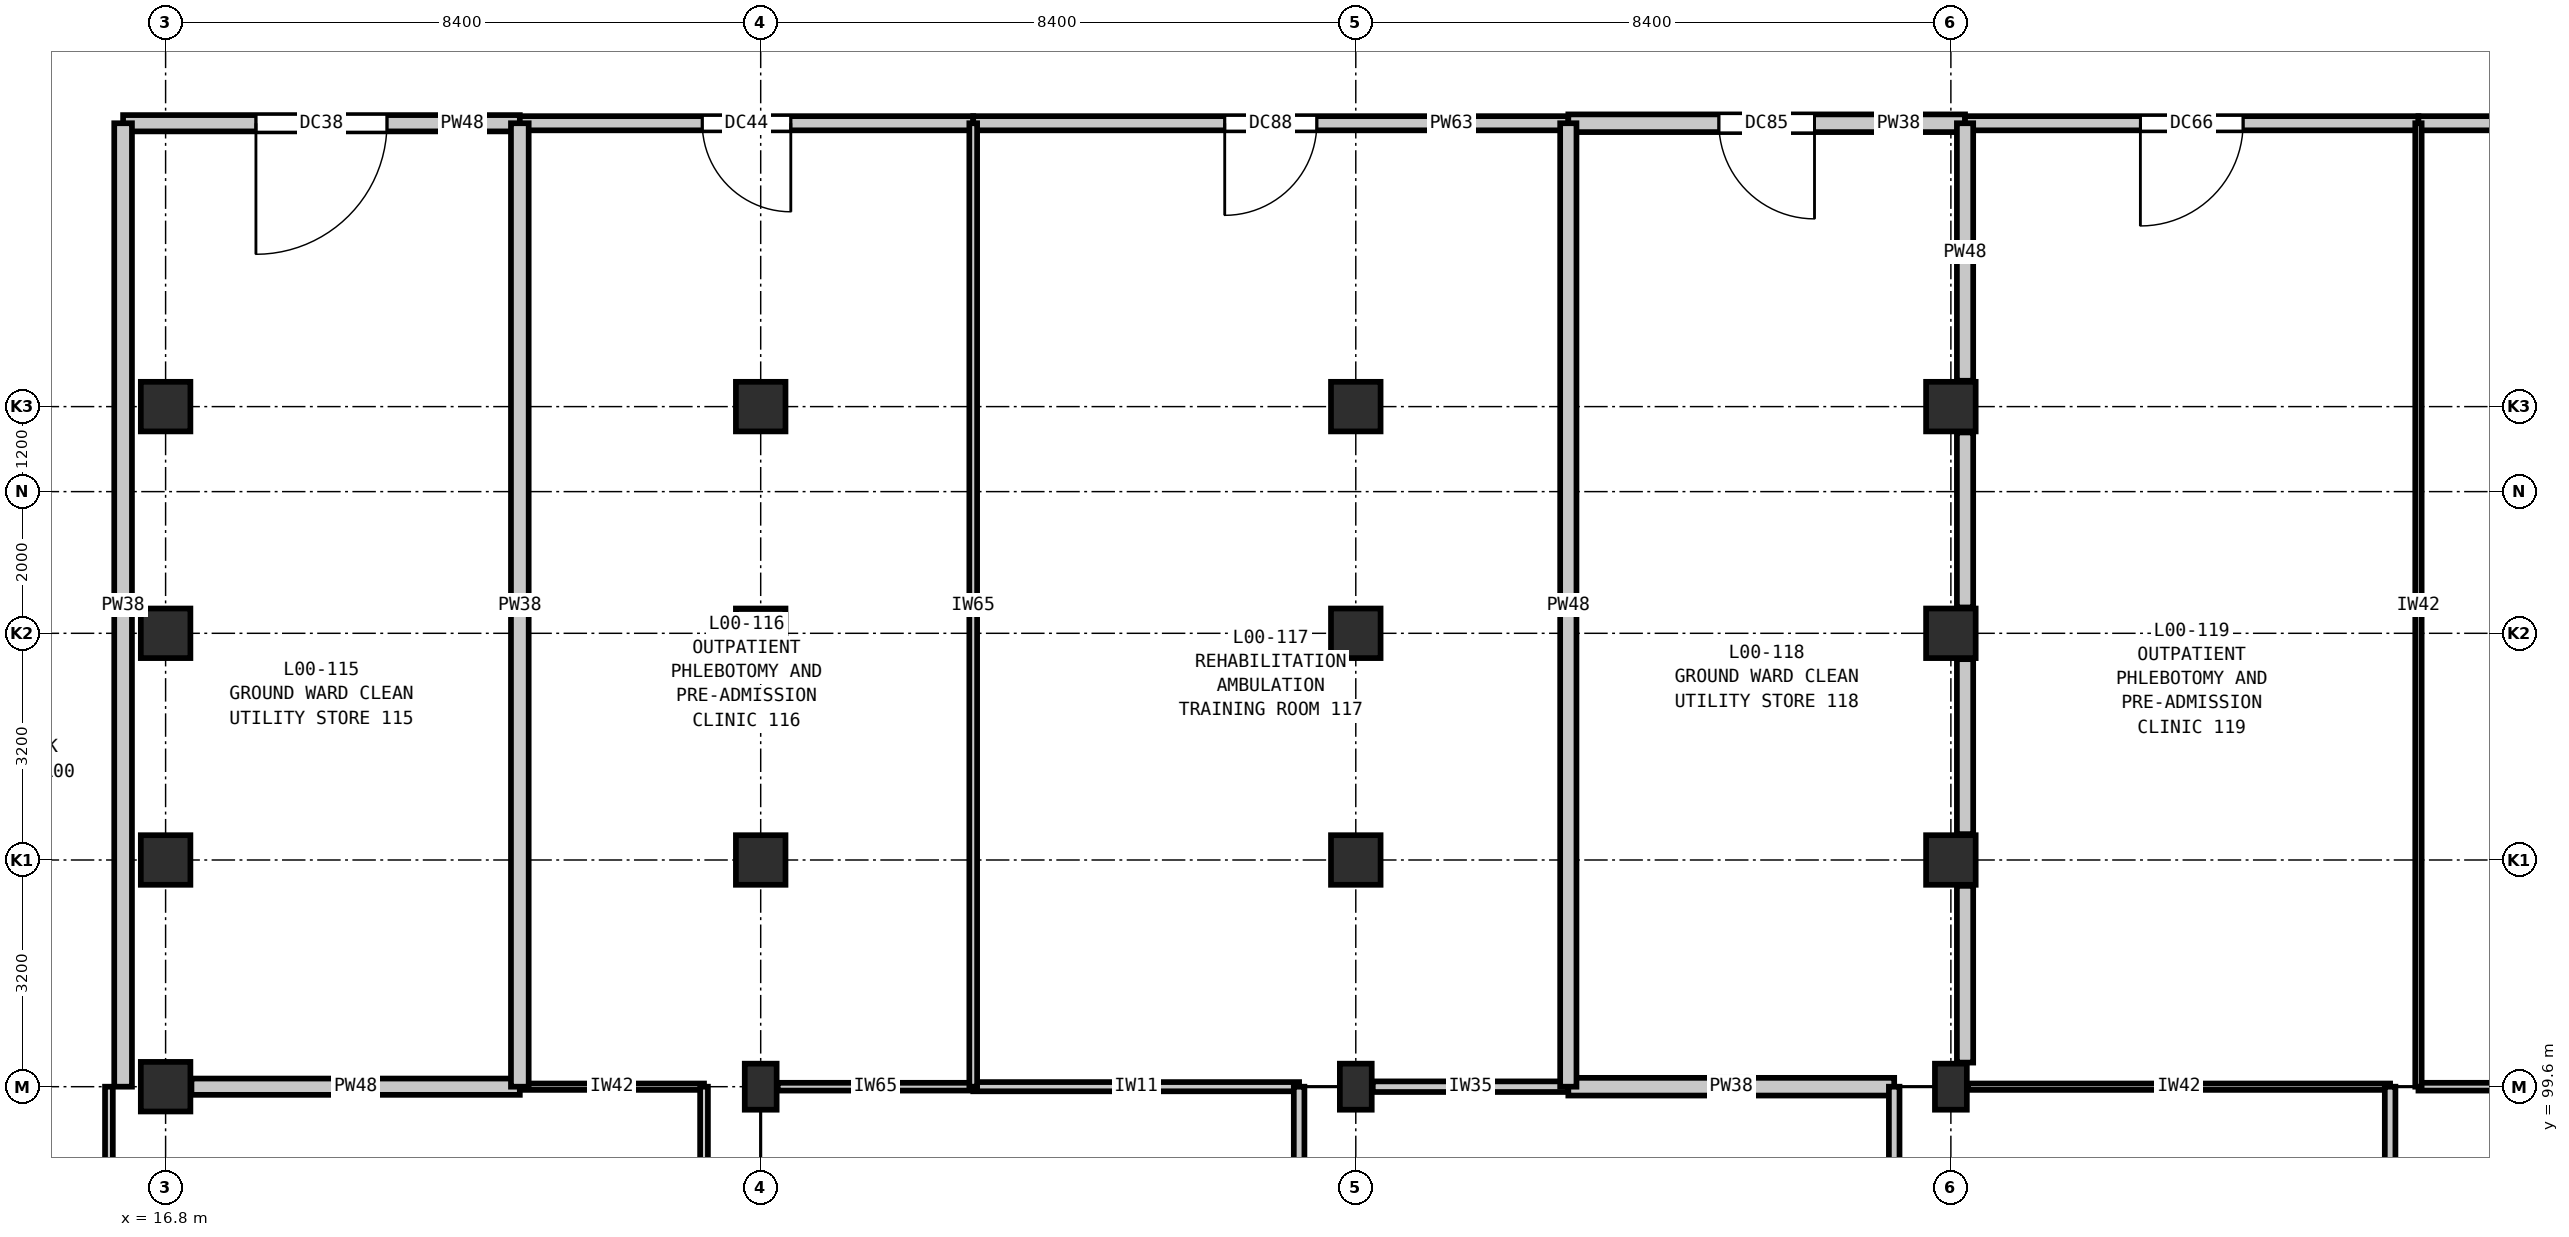
"""IFC4 building model, lengths in metres.
Left out: names, types, materials, properties, quantities, classifications, styles, units other than length and angle.
Written with IfcOpenShell. Run it as: python <this file> out.ifc"""

import sys

from ifc_helpers import new_model, si_unit, direction, frame, frame_2d, origin, origin_2d, place, context, subcontext, project, spatial, rectangle, extrude, element, fill, save


model = new_model("IFC4")
c1 = context("Model", 3, precision=1e-05, world=origin(), true_north=direction((0.0, 1.0)))
c2 = subcontext(c1, "Body", "Model", "MODEL_VIEW")
j1 = project(units=[si_unit("LENGTHUNIT", "METRE"), si_unit("PLANEANGLEUNIT", "RADIAN")], contexts=[c1])
p1 = place(None, origin())
s1 = spatial("IfcSite", under=j1, at=p1, CompositionType="ELEMENT")
p2 = place(p1, origin())
s2 = spatial("IfcBuilding", under=s1, at=p2, CompositionType="ELEMENT")
p3 = place(p2, origin())
s3 = spatial("IfcBuildingStorey", under=s2, at=p3, CompositionType="ELEMENT", Elevation=0.0)
for number, where, z_axis, x_axis in (
    (1, (16.8, 99.6, 0.0), (0.0, 0.0, 1.0), (1.0, 0.0, 0.0)),
    (2, (16.8, 102.8, 0.0), (0.0, 0.0, 1.0), (1.0, 0.0, 0.0)),
    (3, (16.8, 106.0, 0.0), (0.0, 0.0, 1.0), (1.0, 0.0, 0.0)),
    (4, (16.8, 109.2, 0.0), (0.0, 0.0, 1.0), (1.0, 0.0, 0.0)),
):
    element("IfcColumn", number, at=place(p3, frame(where, z_axis=z_axis, x_axis=x_axis)), inside=s3, PredefinedType="COLUMN", context=c2, shape_type="SweptSolid", body=[
        extrude(rectangle(XDim=0.7, YDim=0.7, at=origin_2d()), origin(), (0.0, 0.0, 1.0), 5.4),
    ])
p4 = place(p3, frame((25.2, 99.6, 0.0), z_axis=(0.0, 0.0, 1.0), x_axis=(1.0, 0.0, 0.0)))
e5 = element("IfcColumn", 5, at=p4, inside=s3, PredefinedType="COLUMN", context=c2, shape_type="SweptSolid", body=[
    extrude(rectangle(XDim=0.45, YDim=0.65, at=origin_2d()), origin(), (0.0, 0.0, 1.0), 5.4),
])
for number, where, z_axis, x_axis in (
    (6, (25.2, 102.8, 0.0), (0.0, 0.0, 1.0), (1.0, 0.0, 0.0)),
    (7, (25.2, 106.0, 0.0), (0.0, 0.0, 1.0), (1.0, 0.0, 0.0)),
    (8, (25.2, 109.2, 0.0), (0.0, 0.0, 1.0), (1.0, 0.0, 0.0)),
):
    element("IfcColumn", number, at=place(p3, frame(where, z_axis=z_axis, x_axis=x_axis)), inside=s3, PredefinedType="COLUMN", context=c2, shape_type="SweptSolid", body=[
        extrude(rectangle(XDim=0.7, YDim=0.7, at=origin_2d()), origin(), (0.0, 0.0, 1.0), 5.4),
    ])
p5 = place(p3, frame((33.6, 99.6, 0.0), z_axis=(0.0, 0.0, 1.0), x_axis=(1.0, 0.0, 0.0)))
e9 = element("IfcColumn", 9, at=p5, inside=s3, PredefinedType="COLUMN", context=c2, shape_type="SweptSolid", body=[
    extrude(rectangle(XDim=0.45, YDim=0.65, at=origin_2d()), origin(), (0.0, 0.0, 1.0), 5.4),
])
for number, where, z_axis, x_axis in (
    (10, (33.6, 102.8, 0.0), (0.0, 0.0, 1.0), (1.0, 0.0, 0.0)),
    (11, (33.6, 106.0, 0.0), (0.0, 0.0, 1.0), (1.0, 0.0, 0.0)),
    (12, (33.6, 109.2, 0.0), (0.0, 0.0, 1.0), (1.0, 0.0, 0.0)),
):
    element("IfcColumn", number, at=place(p3, frame(where, z_axis=z_axis, x_axis=x_axis)), inside=s3, PredefinedType="COLUMN", context=c2, shape_type="SweptSolid", body=[
        extrude(rectangle(XDim=0.7, YDim=0.7, at=origin_2d()), origin(), (0.0, 0.0, 1.0), 5.4),
    ])
p6 = place(p3, frame((42.0, 99.6, 0.0), z_axis=(0.0, 0.0, 1.0), x_axis=(1.0, 0.0, 0.0)))
e13 = element("IfcColumn", 13, at=p6, inside=s3, PredefinedType="COLUMN", context=c2, shape_type="SweptSolid", body=[
    extrude(rectangle(XDim=0.45, YDim=0.65, at=origin_2d()), origin(), (0.0, 0.0, 1.0), 5.4),
])
for number, where, z_axis, x_axis in (
    (14, (42.0, 102.8, 0.0), (0.0, 0.0, 1.0), (1.0, 0.0, 0.0)),
    (15, (42.0, 106.0, 0.0), (0.0, 0.0, 1.0), (1.0, 0.0, 0.0)),
    (16, (42.0, 109.2, 0.0), (0.0, 0.0, 1.0), (1.0, 0.0, 0.0)),
):
    element("IfcColumn", number, at=place(p3, frame(where, z_axis=z_axis, x_axis=x_axis)), inside=s3, PredefinedType="COLUMN", context=c2, shape_type="SweptSolid", body=[
        extrude(rectangle(XDim=0.7, YDim=0.7, at=origin_2d()), origin(), (0.0, 0.0, 1.0), 5.4),
    ])
p7 = place(p3, frame((17.165, 99.6, 0.0), z_axis=(0.0, 0.0, 1.0), x_axis=(1.0, 0.0, 0.0)))
e17 = element("IfcWall", 17, at=p7, inside=s3, PredefinedType="PARTITIONING", context=c2, shape_type="SweptSolid", body=[
    extrude(rectangle(XDim=4.635, YDim=0.23, at=frame_2d((2.317, 0.0))), origin(), (0.0, 0.0, 1.0), 4.635),
])
p8 = place(p3, frame((21.8, 99.6, 0.0), z_axis=(0.0, 0.0, 1.0), x_axis=(1.0, 0.0, 0.0)))
e18 = element("IfcWall", 18, at=p8, inside=s3, PredefinedType="PARTITIONING", context=c2, shape_type="SweptSolid", body=[
    extrude(rectangle(XDim=2.6, YDim=0.09, at=frame_2d((1.3, 0.0))), origin(), (0.0, 0.0, 1.0), 4.635),
])
p9 = place(p3, frame((25.44, 99.6, 0.0), z_axis=(0.0, 0.0, 1.0), x_axis=(1.0, 0.0, 0.0)))
e19 = element("IfcWall", 19, at=p9, inside=s3, PredefinedType="PARTITIONING", context=c2, shape_type="SweptSolid", body=[
    extrude(rectangle(XDim=2.76, YDim=0.11, at=frame_2d((1.38, 0.0))), origin(), (0.0, 0.0, 1.0), 4.635),
])
p10 = place(p3, frame((28.2, 99.6, 0.0), z_axis=(0.0, 0.0, 1.0), x_axis=(1.0, 0.0, 0.0)))
e20 = element("IfcWall", 20, at=p10, inside=s3, PredefinedType="PARTITIONING", context=c2, shape_type="SweptSolid", body=[
    extrude(rectangle(XDim=4.6, YDim=0.13, at=frame_2d((2.3, 0.0))), origin(), (0.0, 0.0, 1.0), 4.635),
])
p11 = place(p3, frame((33.84, 99.6, 0.0), z_axis=(0.0, 0.0, 1.0), x_axis=(1.0, 0.0, 0.0)))
e21 = element("IfcWall", 21, at=p11, inside=s3, PredefinedType="PARTITIONING", context=c2, shape_type="SweptSolid", body=[
    extrude(rectangle(XDim=2.76, YDim=0.15, at=frame_2d((1.38, 0.0))), origin(), (0.0, 0.0, 1.0), 4.635),
])
p12 = place(p3, frame((36.6, 99.6, 0.0), z_axis=(0.0, 0.0, 1.0), x_axis=(1.0, 0.0, 0.0)))
e22 = element("IfcWall", 22, at=p12, inside=s3, PredefinedType="PARTITIONING", context=c2, shape_type="SweptSolid", body=[
    extrude(rectangle(XDim=4.6, YDim=0.25, at=frame_2d((2.3, 0.0))), origin(), (0.0, 0.0, 1.0), 4.635),
])
p13 = place(p3, frame((42.24, 99.6, 0.0), z_axis=(0.0, 0.0, 1.0), x_axis=(1.0, 0.0, 0.0)))
e23 = element("IfcWall", 23, at=p13, inside=s3, PredefinedType="PARTITIONING", context=c2, shape_type="SweptSolid", body=[
    extrude(rectangle(XDim=5.96, YDim=0.09, at=frame_2d((2.98, 0.0))), origin(), (0.0, 0.0, 1.0), 4.635),
])
p14 = place(p3, frame((48.6, 99.6, 0.0), z_axis=(0.0, 0.0, 1.0), x_axis=(1.0, 0.0, 0.0)))
e24 = element("IfcWall", 24, at=p14, inside=s3, PredefinedType="PARTITIONING", context=c2, shape_type="SweptSolid", body=[
    extrude(rectangle(XDim=1.56, YDim=0.11, at=frame_2d((0.78, 0.0))), origin(), (0.0, 0.0, 1.0), 4.635),
])
p15 = place(p3, frame((16.2, 113.2, 0.0), z_axis=(0.0, 0.0, 1.0), x_axis=(1.0, 0.0, 0.0)))
e25 = element("IfcWall", 25, at=p15, inside=s3, PredefinedType="PARTITIONING", context=c2, shape_type="SweptSolid", body=[
    extrude(rectangle(XDim=5.6, YDim=0.23, at=frame_2d((2.8, 0.0))), origin(), (0.0, 0.0, 1.0), 5.04),
])
p16 = place(p15, frame((1.875, 0.0, 0.0)))
e26 = element("IfcOpeningElement", 26, at=p16, cuts=e25, PredefinedType="OPENING", context=c2, shape_type="SweptSolid", body=[
    extrude(rectangle(XDim=1.85, YDim=2.3, at=frame_2d((0.925, 1.15))), frame((0.0, 0.125, 0.0), z_axis=(0.0, -1.0, 0.0), x_axis=(1.0, 0.0, 0.0)), (0.0, 0.0, 1.0), 0.25),
])
p17 = place(p3, frame((21.8, 113.2, 0.0), z_axis=(0.0, 0.0, 1.0), x_axis=(1.0, 0.0, 0.0)))
e27 = element("IfcWall", 27, at=p17, inside=s3, PredefinedType="PARTITIONING", context=c2, shape_type="SweptSolid", body=[
    extrude(rectangle(XDim=6.4, YDim=0.2, at=frame_2d((3.2, 0.0))), origin(), (0.0, 0.0, 1.0), 5.04),
])
p18 = place(p17, frame((2.575, 0.0, 0.0)))
e28 = element("IfcOpeningElement", 28, at=p18, cuts=e27, PredefinedType="OPENING", context=c2, shape_type="SweptSolid", body=[
    extrude(rectangle(XDim=1.25, YDim=2.15, at=frame_2d((0.625, 1.075))), frame((0.0, 0.11, 0.0), z_axis=(0.0, -1.0, 0.0), x_axis=(1.0, 0.0, 0.0)), (0.0, 0.0, 1.0), 0.22),
])
p19 = place(p3, frame((28.2, 113.2, 0.0), z_axis=(0.0, 0.0, 1.0), x_axis=(1.0, 0.0, 0.0)))
e29 = element("IfcWall", 29, at=p19, inside=s3, PredefinedType="PARTITIONING", context=c2, shape_type="SweptSolid", body=[
    extrude(rectangle(XDim=8.4, YDim=0.2, at=frame_2d((4.2, 0.0))), origin(), (0.0, 0.0, 1.0), 5.04),
])
p20 = place(p19, frame((3.55, 0.0, 0.0)))
e30 = element("IfcOpeningElement", 30, at=p20, cuts=e29, PredefinedType="OPENING", context=c2, shape_type="SweptSolid", body=[
    extrude(rectangle(XDim=1.3, YDim=2.2, at=frame_2d((0.65, 1.1))), frame((0.0, 0.11, 0.0), z_axis=(0.0, -1.0, 0.0), x_axis=(1.0, 0.0, 0.0)), (0.0, 0.0, 1.0), 0.22),
])
p21 = place(p3, frame((36.6, 113.2, 0.0), z_axis=(0.0, 0.0, 1.0), x_axis=(1.0, 0.0, 0.0)))
e31 = element("IfcWall", 31, at=p21, inside=s3, PredefinedType="PARTITIONING", context=c2, shape_type="SweptSolid", body=[
    extrude(rectangle(XDim=5.6, YDim=0.25, at=frame_2d((2.8, 0.0))), origin(), (0.0, 0.0, 1.0), 5.04),
])
p22 = place(p21, frame((2.125, 0.0, 0.0)))
e32 = element("IfcOpeningElement", 32, at=p22, cuts=e31, PredefinedType="OPENING", context=c2, shape_type="SweptSolid", body=[
    extrude(rectangle(XDim=1.35, YDim=2.2, at=frame_2d((0.675, 1.1))), frame((0.0, 0.135, 0.0), z_axis=(0.0, -1.0, 0.0), x_axis=(1.0, 0.0, 0.0)), (0.0, 0.0, 1.0), 0.27),
])
p23 = place(p3, frame((42.2, 113.2, 0.0), z_axis=(0.0, 0.0, 1.0), x_axis=(1.0, 0.0, 0.0)))
e33 = element("IfcWall", 33, at=p23, inside=s3, PredefinedType="PARTITIONING", context=c2, shape_type="SweptSolid", body=[
    extrude(rectangle(XDim=6.4, YDim=0.2, at=frame_2d((3.2, 0.0))), origin(), (0.0, 0.0, 1.0), 5.04),
])
p24 = place(p23, frame((2.475, 0.0, 0.0)))
e34 = element("IfcOpeningElement", 34, at=p24, cuts=e33, PredefinedType="OPENING", context=c2, shape_type="SweptSolid", body=[
    extrude(rectangle(XDim=1.45, YDim=2.25, at=frame_2d((0.725, 1.125))), frame((0.0, 0.11, 0.0), z_axis=(0.0, -1.0, 0.0), x_axis=(1.0, 0.0, 0.0)), (0.0, 0.0, 1.0), 0.22),
])
p25 = place(p3, frame((48.6, 113.2, 0.0), z_axis=(0.0, 0.0, 1.0), x_axis=(1.0, 0.0, 0.0)))
e35 = element("IfcWall", 35, at=p25, inside=s3, PredefinedType="PARTITIONING", context=c2, shape_type="SweptSolid", body=[
    extrude(rectangle(XDim=8.4, YDim=0.2, at=frame_2d((4.2, 0.0))), origin(), (0.0, 0.0, 1.0), 5.04),
])
p26 = place(p25, frame((3.425, 0.0, 0.0)))
e36 = element("IfcOpeningElement", 36, at=p26, cuts=e35, PredefinedType="OPENING", context=c2, shape_type="SweptSolid", body=[
    extrude(rectangle(XDim=1.55, YDim=2.25, at=frame_2d((0.775, 1.125))), frame((0.0, 0.11, 0.0), z_axis=(0.0, -1.0, 0.0), x_axis=(1.0, 0.0, 0.0)), (0.0, 0.0, 1.0), 0.22),
])
p27 = place(p3, frame((16.0, 88.6, 0.0), z_axis=(0.0, 0.0, 1.0), x_axis=(0.0, 1.0, 0.0)))
e37 = element("IfcWall", 37, at=p27, inside=s3, PredefinedType="PARTITIONING", context=c2, shape_type="SweptSolid", body=[
    extrude(rectangle(XDim=11.0, YDim=0.11, at=frame_2d((5.5, 0.0))), origin(), (0.0, 0.0, 1.0), 5.04),
])
for number, where, z_axis, x_axis in (
    (38, (16.2, 99.6, 0.0), (0.0, 0.0, 1.0), (0.0, 1.0, 0.0)),
    (39, (21.8, 99.6, 0.0), (0.0, 0.0, 1.0), (0.0, 1.0, 0.0)),
):
    element("IfcWall", number, at=place(p3, frame(where, z_axis=z_axis, x_axis=x_axis)), inside=s3, PredefinedType="PARTITIONING", context=c2, shape_type="SweptSolid", body=[
        extrude(rectangle(XDim=13.6, YDim=0.25, at=frame_2d((6.8, 0.0))), origin(), (0.0, 0.0, 1.0), 5.04),
    ])
p28 = place(p3, frame((24.4, 88.6, 0.0), z_axis=(0.0, 0.0, 1.0), x_axis=(0.0, 1.0, 0.0)))
e40 = element("IfcWall", 40, at=p28, inside=s3, PredefinedType="PARTITIONING", context=c2, shape_type="SweptSolid", body=[
    extrude(rectangle(XDim=11.0, YDim=0.11, at=frame_2d((5.5, 0.0))), origin(), (0.0, 0.0, 1.0), 5.04),
])
p29 = place(p3, frame((28.2, 99.6, 0.0), z_axis=(0.0, 0.0, 1.0), x_axis=(0.0, 1.0, 0.0)))
e41 = element("IfcWall", 41, at=p29, inside=s3, PredefinedType="PARTITIONING", context=c2, shape_type="SweptSolid", body=[
    extrude(rectangle(XDim=13.6, YDim=0.11, at=frame_2d((6.8, 0.0))), origin(), (0.0, 0.0, 1.0), 5.04),
])
p30 = place(p3, frame((32.8, 88.6, 0.0), z_axis=(0.0, 0.0, 1.0), x_axis=(0.0, 1.0, 0.0)))
e42 = element("IfcWall", 42, at=p30, inside=s3, PredefinedType="PARTITIONING", context=c2, shape_type="SweptSolid", body=[
    extrude(rectangle(XDim=11.0, YDim=0.15, at=frame_2d((5.5, 0.0))), origin(), (0.0, 0.0, 1.0), 5.04),
])
p31 = place(p3, frame((36.6, 99.6, 0.0), z_axis=(0.0, 0.0, 1.0), x_axis=(0.0, 1.0, 0.0)))
e43 = element("IfcWall", 43, at=p31, inside=s3, PredefinedType="PARTITIONING", context=c2, shape_type="SweptSolid", body=[
    extrude(rectangle(XDim=13.6, YDim=0.23, at=frame_2d((6.8, 0.0))), origin(), (0.0, 0.0, 1.0), 5.04),
])
p32 = place(p3, frame((41.2, 88.6, 0.0), z_axis=(0.0, 0.0, 1.0), x_axis=(0.0, 1.0, 0.0)))
e44 = element("IfcWall", 44, at=p32, inside=s3, PredefinedType="PARTITIONING", context=c2, shape_type="SweptSolid", body=[
    extrude(rectangle(XDim=11.0, YDim=0.15, at=frame_2d((5.5, 0.0))), origin(), (0.0, 0.0, 1.0), 5.04),
])
p33 = place(p3, frame((42.2, 109.565, 0.0), z_axis=(0.0, 0.0, 1.0), x_axis=(0.0, 1.0, 0.0)))
e45 = element("IfcWall", 45, at=p33, inside=s3, PredefinedType="PARTITIONING", context=c2, shape_type="SweptSolid", body=[
    extrude(rectangle(XDim=3.635, YDim=0.23, at=frame_2d((1.817, 0.0))), origin(), (0.0, 0.0, 1.0), 4.685),
])
p34 = place(p3, frame((42.2, 99.94, 0.0), z_axis=(0.0, 0.0, 1.0), x_axis=(0.0, 1.0, 0.0)))
e46 = element("IfcWall", 46, at=p34, inside=s3, PredefinedType="PARTITIONING", context=c2, shape_type="SweptSolid", body=[
    extrude(rectangle(XDim=2.495, YDim=0.23, at=frame_2d((1.248, 0.0))), origin(), (0.0, 0.0, 1.0), 4.685),
])
for number, where, z_axis, x_axis in (
    (47, (42.2, 103.165, 0.0), (0.0, 0.0, 1.0), (0.0, 1.0, 0.0)),
    (48, (42.2, 106.365, 0.0), (0.0, 0.0, 1.0), (0.0, 1.0, 0.0)),
):
    element("IfcWall", number, at=place(p3, frame(where, z_axis=z_axis, x_axis=x_axis)), inside=s3, PredefinedType="PARTITIONING", context=c2, shape_type="SweptSolid", body=[
        extrude(rectangle(XDim=2.47, YDim=0.23, at=frame_2d((1.235, 0.0))), origin(), (0.0, 0.0, 1.0), 4.685),
    ])
p35 = place(p3, frame((48.2, 88.6, 0.0), z_axis=(0.0, 0.0, 1.0), x_axis=(0.0, 1.0, 0.0)))
e49 = element("IfcWall", 49, at=p35, inside=s3, PredefinedType="PARTITIONING", context=c2, shape_type="SweptSolid", body=[
    extrude(rectangle(XDim=11.0, YDim=0.15, at=frame_2d((5.5, 0.0))), origin(), (0.0, 0.0, 1.0), 5.04),
])
p36 = place(p3, frame((48.6, 99.6, 0.0), z_axis=(0.0, 0.0, 1.0), x_axis=(0.0, 1.0, 0.0)))
e50 = element("IfcWall", 50, at=p36, inside=s3, PredefinedType="PARTITIONING", context=c2, shape_type="SweptSolid", body=[
    extrude(rectangle(XDim=13.6, YDim=0.09, at=frame_2d((6.8, 0.0))), origin(), (0.0, 0.0, 1.0), 5.04),
])
p37 = place(p16, frame((1.85, 0.0, 0.0), z_axis=(0.0, 0.0, 1.0), x_axis=(-1.0, 0.0, 0.0)))
e51 = element("IfcDoor", 51, at=p37, inside=s3, OperationType="SINGLE_SWING_RIGHT", PredefinedType="DOOR", context=c2, shape_type="SweptSolid", body=[
    extrude(rectangle(XDim=1.85, YDim=2.3, at=frame_2d((0.925, 1.15))), frame((0.0, 0.025, 0.0), z_axis=(0.0, -1.0, 0.0), x_axis=(1.0, 0.0, 0.0)), (0.0, 0.0, 1.0), 0.05),
])
fill(e26, e51)
p38 = place(p18, frame((1.25, 0.0, 0.0), z_axis=(0.0, 0.0, 1.0), x_axis=(-1.0, 0.0, 0.0)))
e52 = element("IfcDoor", 52, at=p38, inside=s3, OperationType="SINGLE_SWING_LEFT", PredefinedType="DOOR", context=c2, shape_type="SweptSolid", body=[
    extrude(rectangle(XDim=1.25, YDim=2.15, at=frame_2d((0.625, 1.075))), frame((0.0, 0.025, 0.0), z_axis=(0.0, -1.0, 0.0), x_axis=(1.0, 0.0, 0.0)), (0.0, 0.0, 1.0), 0.05),
])
fill(e28, e52)
p39 = place(p20, frame((1.3, 0.0, 0.0), z_axis=(0.0, 0.0, 1.0), x_axis=(-1.0, 0.0, 0.0)))
e53 = element("IfcDoor", 53, at=p39, inside=s3, OperationType="SINGLE_SWING_RIGHT", PredefinedType="DOOR", context=c2, shape_type="SweptSolid", body=[
    extrude(rectangle(XDim=1.3, YDim=2.2, at=frame_2d((0.65, 1.1))), frame((0.0, 0.025, 0.0), z_axis=(0.0, -1.0, 0.0), x_axis=(1.0, 0.0, 0.0)), (0.0, 0.0, 1.0), 0.05),
])
fill(e30, e53)
p40 = place(p22, frame((1.35, 0.0, 0.0), z_axis=(0.0, 0.0, 1.0), x_axis=(-1.0, 0.0, 0.0)))
e54 = element("IfcDoor", 54, at=p40, inside=s3, OperationType="SINGLE_SWING_LEFT", PredefinedType="DOOR", context=c2, shape_type="SweptSolid", body=[
    extrude(rectangle(XDim=1.35, YDim=2.2, at=frame_2d((0.675, 1.1))), frame((0.0, 0.025, 0.0), z_axis=(0.0, -1.0, 0.0), x_axis=(1.0, 0.0, 0.0)), (0.0, 0.0, 1.0), 0.05),
])
fill(e32, e54)
p41 = place(p24, frame((1.45, 0.0, 0.0), z_axis=(0.0, 0.0, 1.0), x_axis=(-1.0, 0.0, 0.0)))
e55 = element("IfcDoor", 55, at=p41, inside=s3, OperationType="SINGLE_SWING_RIGHT", PredefinedType="DOOR", context=c2, shape_type="SweptSolid", body=[
    extrude(rectangle(XDim=1.45, YDim=2.25, at=frame_2d((0.725, 1.125))), frame((0.0, 0.025, 0.0), z_axis=(0.0, -1.0, 0.0), x_axis=(1.0, 0.0, 0.0)), (0.0, 0.0, 1.0), 0.05),
])
fill(e34, e55)
save(model, sys.argv[1])
